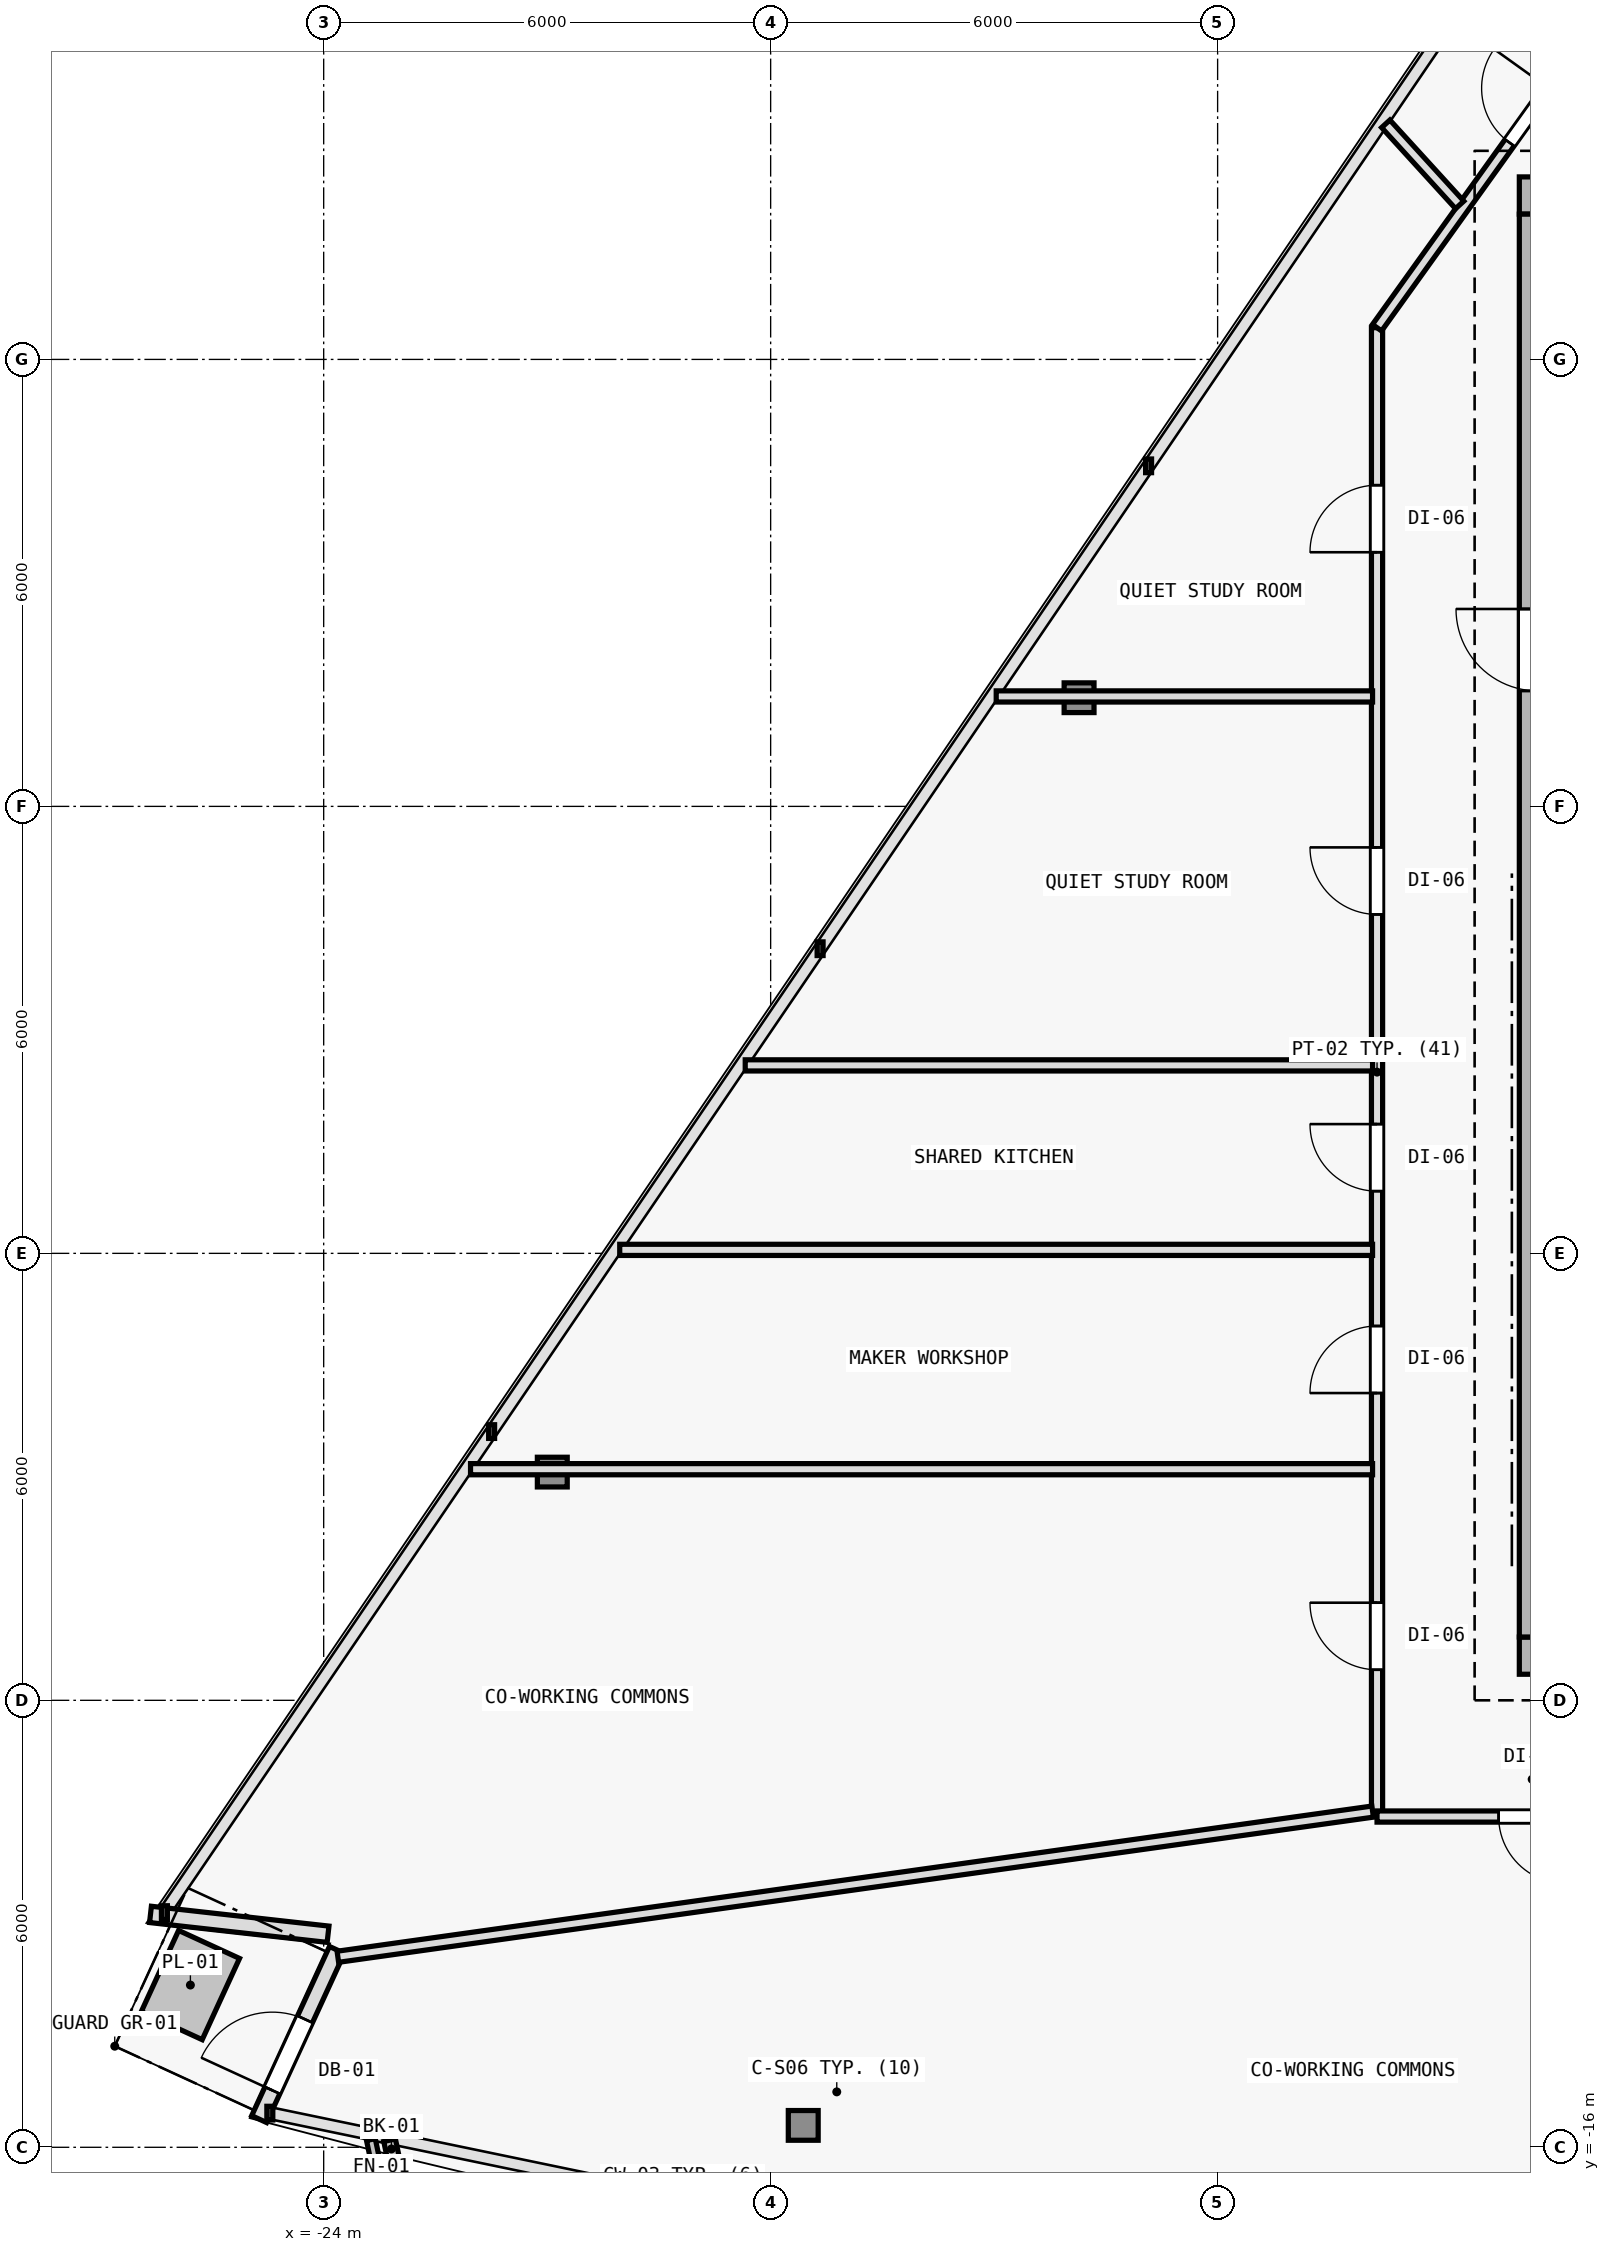
"""IFC4 building model, lengths in metres.
Left out: names, types, materials, properties, quantities, classifications, styles, units other than length and angle.
Written with IfcOpenShell. Run it as: python <this file> out.ifc"""

import sys

from ifc_helpers import new_model, si_unit, direction, frame, frame_2d, origin, origin_2d, place, context, subcontext, project, spatial, rectangle, i_section, extrude, element, fill, save


model = new_model("IFC4")
c1 = context("Model", 3, precision=1e-05, world=origin(), true_north=direction((0.0, 1.0)))
c2 = subcontext(c1, "Body", "Model", "MODEL_VIEW")
j1 = project(units=[si_unit("LENGTHUNIT", "METRE"), si_unit("PLANEANGLEUNIT", "RADIAN")], contexts=[c1])
p1 = place(None, origin())
s1 = spatial("IfcSite", under=j1, at=p1, CompositionType="ELEMENT")
p2 = place(p1, origin())
s2 = spatial("IfcBuilding", under=s1, at=p2, CompositionType="ELEMENT")
p3 = place(p2, frame((0.0, 0.0, 167.4)))
s3 = spatial("IfcBuildingStorey", under=s2, at=p3, CompositionType="ELEMENT", Elevation=167.4)
for number, where, z_axis, x_axis in (
    (1, (-7.7, -9.4, 0.0), (0.0, 0.0, 1.0), (1.0, 0.0, 0.0)),
    (2, (-7.7, 10.2, 0.0), (0.0, 0.0, 1.0), (1.0, 0.0, 0.0)),
    (3, (-7.7, 2.0, 0.0), (0.0, 0.0, 1.0), (1.0, 0.0, 0.0)),
):
    element("IfcColumn", number, at=place(p3, frame(where, z_axis=z_axis, x_axis=x_axis)), inside=s3, PredefinedType="COLUMN", context=c2, shape_type="SweptSolid", body=[
        extrude(i_section(OverallWidth=0.404, OverallDepth=0.407, WebThickness=0.017, FlangeThickness=0.028, FilletRadius=0.015, at=origin_2d()), origin(), (0.0, 0.0, 1.0), 3.6),
    ])
p4 = place(p3, frame((-17.562, -15.706, 0.006), z_axis=(0.020596292833, 0.033511459955, 0.999226087917), x_axis=(-0.851954850327, 0.523615252838, 0.0)))
e4 = element("IfcColumn", 4, at=p4, inside=s3, PredefinedType="COLUMN", context=c2, shape_type="SweptSolid", body=[
    extrude(i_section(OverallWidth=0.401, OverallDepth=0.399, WebThickness=0.016, FlangeThickness=0.025, FilletRadius=0.015, at=origin_2d()), origin(), (0.0, 0.0, 1.0), 3.592),
])
p5 = place(p3, frame((-13.86, 3.459, 0.006), z_axis=(0.017003572908, 0.009522000828, 0.999810086971), x_axis=(-0.488603368932, 0.87250601595, 0.0)))
e5 = element("IfcColumn", 5, at=p5, inside=s3, PredefinedType="COLUMN", context=c2, shape_type="SweptSolid", body=[
    extrude(i_section(OverallWidth=0.401, OverallDepth=0.399, WebThickness=0.016, FlangeThickness=0.025, FilletRadius=0.015, at=origin_2d()), origin(), (0.0, 0.0, 1.0), 3.59),
])
p6 = place(p3, frame((-20.931, -6.936, 0.006), z_axis=(0.025224163578, 0.021620711639, 0.999447990843), x_axis=(-0.650791373456, 0.759256602365, 0.0)))
e6 = element("IfcColumn", 6, at=p6, inside=s3, PredefinedType="COLUMN", context=c2, shape_type="SweptSolid", body=[
    extrude(i_section(OverallWidth=0.401, OverallDepth=0.399, WebThickness=0.016, FlangeThickness=0.025, FilletRadius=0.015, at=origin_2d()), origin(), (0.0, 0.0, 1.0), 3.591),
])
p7 = place(p3, frame((-23.941, -13.14, 0.0), z_axis=(0.0, 0.0, 1.0), x_axis=(-0.993825249999, 0.110956624245, 0.0)))
e7 = element("IfcWall", 7, at=p7, inside=s3, PredefinedType="SOLIDWALL", context=c2, shape_type="SweptSolid", body=[
    extrude(rectangle(XDim=2.398, YDim=0.22, at=frame_2d((1.199, 0.0))), origin(), (0.0, 0.0, 1.0), 3.35),
])
p8 = place(p3, frame((-24.866, -15.622, 0.0), z_axis=(0.0, 0.0, 1.0), x_axis=(0.417478378529, 0.908686856657, 0.0)))
e8 = element("IfcWall", 8, at=p8, inside=s3, PredefinedType="SOLIDWALL", context=c2, shape_type="SweptSolid", body=[
    extrude(rectangle(XDim=2.5, YDim=0.22, at=frame_2d((1.25, 0.0))), origin(), (0.0, 0.0, 1.0), 3.35),
])
p9 = place(p8, frame((0.425, 0.0, 0.0)))
e9 = element("IfcOpeningElement", 9, at=p9, cuts=e8, PredefinedType="OPENING", context=c2, shape_type="SweptSolid", body=[
    extrude(rectangle(XDim=1.05, YDim=2.15, at=frame_2d((0.525, 1.075))), frame((0.0, 0.12, 0.0), z_axis=(0.0, -1.0, 0.0), x_axis=(1.0, 0.0, 0.0)), (0.0, 0.0, 1.0), 0.24),
])
p10 = place(p3, frame((-7.95, -9.4, 0.0), z_axis=(0.0, 0.0, 1.0), x_axis=(1.0, 0.0, 0.0)))
e10 = element("IfcWall", 10, at=p10, inside=s3, PredefinedType="SHEAR", context=c2, shape_type="SweptSolid", body=[
    extrude(rectangle(XDim=15.9, YDim=0.5, at=frame_2d((7.95, 0.0))), origin(), (0.0, 0.0, 1.0), 3.35),
])
p11 = place(p10, frame((9.6, 0.0, 0.0)))
e11 = element("IfcOpeningElement", 11, at=p11, cuts=e10, PredefinedType="OPENING", context=c2, shape_type="SweptSolid", body=[
    extrude(rectangle(XDim=1.5, YDim=2.2, at=frame_2d((0.75, 1.1))), frame((0.0, 0.26, 0.0), z_axis=(0.0, -1.0, 0.0), x_axis=(1.0, 0.0, 0.0)), (0.0, 0.0, 1.0), 0.52),
])
p12 = place(p3, frame((7.95, 10.2, 0.0), z_axis=(0.0, 0.0, 1.0), x_axis=(-1.0, 0.0, 0.0)))
e12 = element("IfcWall", 12, at=p12, inside=s3, PredefinedType="SHEAR", context=c2, shape_type="SweptSolid", body=[
    extrude(rectangle(XDim=15.9, YDim=0.5, at=frame_2d((7.95, 0.0))), origin(), (0.0, 0.0, 1.0), 3.35),
])
p13 = place(p12, frame((4.4, 0.0, 0.0)))
e13 = element("IfcOpeningElement", 13, at=p13, cuts=e12, PredefinedType="OPENING", context=c2, shape_type="SweptSolid", body=[
    extrude(rectangle(XDim=1.1, YDim=2.15, at=frame_2d((0.55, 1.075))), frame((0.0, 0.26, 0.0), z_axis=(0.0, -1.0, 0.0), x_axis=(1.0, 0.0, 0.0)), (0.0, 0.0, 1.0), 0.52),
])
p14 = place(p3, frame((-7.7, -9.15, 0.0), z_axis=(0.0, 0.0, 1.0), x_axis=(0.0, 1.0, 0.0)))
e14 = element("IfcWall", 14, at=p14, inside=s3, PredefinedType="SHEAR", context=c2, shape_type="SweptSolid", body=[
    extrude(rectangle(XDim=19.1, YDim=0.5, at=frame_2d((9.55, 0.0))), origin(), (0.0, 0.0, 1.0), 3.35),
])
p15 = place(p14, frame((12.7, 0.0, 0.0)))
e15 = element("IfcOpeningElement", 15, at=p15, cuts=e14, PredefinedType="OPENING", context=c2, shape_type="SweptSolid", body=[
    extrude(rectangle(XDim=1.1, YDim=2.15, at=frame_2d((0.55, 1.075))), frame((0.0, 0.26, 0.0), z_axis=(0.0, -1.0, 0.0), x_axis=(1.0, 0.0, 0.0)), (0.0, 0.0, 1.0), 0.52),
])
p16 = place(p3, frame((-9.86, -11.56, 0.0), z_axis=(0.0, 0.0, 1.0), x_axis=(0.0, 1.0, 0.0)))
e16 = element("IfcWall", 16, at=p16, inside=s3, PredefinedType="PARTITIONING", context=c2, shape_type="SweptSolid", body=[
    extrude(rectangle(XDim=19.986, YDim=0.15, at=frame_2d((9.993, 0.0))), origin(), (0.0, 0.0, 1.0), 2.775),
])
p17 = place(p16, frame((8.395, 0.0, 0.0)))
e17 = element("IfcOpeningElement", 17, at=p17, cuts=e16, PredefinedType="OPENING", context=c2, shape_type="SweptSolid", body=[
    extrude(rectangle(XDim=0.9, YDim=2.1, at=frame_2d((0.45, 1.05))), frame((0.0, 0.085, 0.0), z_axis=(0.0, -1.0, 0.0), x_axis=(1.0, 0.0, 0.0)), (0.0, 0.0, 1.0), 0.17),
])
p18 = place(p16, frame((5.685, 0.0, 0.0)))
e18 = element("IfcOpeningElement", 18, at=p18, cuts=e16, PredefinedType="OPENING", context=c2, shape_type="SweptSolid", body=[
    extrude(rectangle(XDim=0.9, YDim=2.1, at=frame_2d((0.45, 1.05))), frame((0.0, 0.085, 0.0), z_axis=(0.0, -1.0, 0.0), x_axis=(1.0, 0.0, 0.0)), (0.0, 0.0, 1.0), 0.17),
])
p19 = place(p16, frame((1.97, 0.0, 0.0)))
e19 = element("IfcOpeningElement", 19, at=p19, cuts=e16, PredefinedType="OPENING", context=c2, shape_type="SweptSolid", body=[
    extrude(rectangle(XDim=0.9, YDim=2.1, at=frame_2d((0.45, 1.05))), frame((0.0, 0.085, 0.0), z_axis=(0.0, -1.0, 0.0), x_axis=(1.0, 0.0, 0.0)), (0.0, 0.0, 1.0), 0.17),
])
p20 = place(p16, frame((16.972, 0.0, 0.0)))
e20 = element("IfcOpeningElement", 20, at=p20, cuts=e16, PredefinedType="OPENING", context=c2, shape_type="SweptSolid", body=[
    extrude(rectangle(XDim=0.9, YDim=2.1, at=frame_2d((0.45, 1.05))), frame((0.0, 0.085, 0.0), z_axis=(0.0, -1.0, 0.0), x_axis=(1.0, 0.0, 0.0)), (0.0, 0.0, 1.0), 0.17),
])
p21 = place(p16, frame((12.11, 0.0, 0.0)))
e21 = element("IfcOpeningElement", 21, at=p21, cuts=e16, PredefinedType="OPENING", context=c2, shape_type="SweptSolid", body=[
    extrude(rectangle(XDim=0.9, YDim=2.1, at=frame_2d((0.45, 1.05))), frame((0.0, 0.085, 0.0), z_axis=(0.0, -1.0, 0.0), x_axis=(1.0, 0.0, 0.0)), (0.0, 0.0, 1.0), 0.17),
])
p22 = place(p3, frame((-9.86, 8.426, 0.0), z_axis=(0.0, 0.0, 1.0), x_axis=(0.582449511476, 0.812866881218, 0.0)))
e22 = element("IfcWall", 22, at=p22, inside=s3, PredefinedType="PARTITIONING", context=c2, shape_type="SweptSolid", body=[
    extrude(rectangle(XDim=4.84, YDim=0.15, at=frame_2d((2.42, 0.0))), origin(), (0.0, 0.0, 1.0), 2.965),
])
p23 = place(p22, frame((3.055, 0.0, 0.0)))
e23 = element("IfcOpeningElement", 23, at=p23, cuts=e22, PredefinedType="OPENING", context=c2, shape_type="SweptSolid", body=[
    extrude(rectangle(XDim=0.9, YDim=2.1, at=frame_2d((0.45, 1.05))), frame((0.0, 0.085, 0.0), z_axis=(0.0, -1.0, 0.0), x_axis=(1.0, 0.0, 0.0)), (0.0, 0.0, 1.0), 0.17),
])
p24 = place(p3, frame((13.18, -11.56, 0.0), z_axis=(0.0, 0.0, 1.0), x_axis=(-1.0, 0.0, 0.0)))
e24 = element("IfcWall", 24, at=p24, inside=s3, PredefinedType="PARTITIONING", context=c2, shape_type="SweptSolid", body=[
    extrude(rectangle(XDim=23.04, YDim=0.15, at=frame_2d((11.52, 0.0))), origin(), (0.0, 0.0, 1.0), 2.775),
])
p25 = place(p24, frame((20.508, 0.0, 0.0)))
e25 = element("IfcOpeningElement", 25, at=p25, cuts=e24, PredefinedType="OPENING", context=c2, shape_type="SweptSolid", body=[
    extrude(rectangle(XDim=0.9, YDim=2.1, at=frame_2d((0.45, 1.05))), frame((0.0, 0.085, 0.0), z_axis=(0.0, -1.0, 0.0), x_axis=(1.0, 0.0, 0.0)), (0.0, 0.0, 1.0), 0.17),
])
p26 = place(p24, frame((17.525, 0.0, 0.0)))
e26 = element("IfcOpeningElement", 26, at=p26, cuts=e24, PredefinedType="OPENING", context=c2, shape_type="SweptSolid", body=[
    extrude(rectangle(XDim=0.9, YDim=2.1, at=frame_2d((0.45, 1.05))), frame((0.0, 0.085, 0.0), z_axis=(0.0, -1.0, 0.0), x_axis=(1.0, 0.0, 0.0)), (0.0, 0.0, 1.0), 0.17),
])
p27 = place(p24, frame((14.848, 0.0, 0.0)))
e27 = element("IfcOpeningElement", 27, at=p27, cuts=e24, PredefinedType="OPENING", context=c2, shape_type="SweptSolid", body=[
    extrude(rectangle(XDim=0.9, YDim=2.1, at=frame_2d((0.45, 1.05))), frame((0.0, 0.085, 0.0), z_axis=(0.0, -1.0, 0.0), x_axis=(1.0, 0.0, 0.0)), (0.0, 0.0, 1.0), 0.17),
])
p28 = place(p24, frame((11.422, 0.0, 0.0)))
e28 = element("IfcOpeningElement", 28, at=p28, cuts=e24, PredefinedType="OPENING", context=c2, shape_type="SweptSolid", body=[
    extrude(rectangle(XDim=0.9, YDim=2.1, at=frame_2d((0.45, 1.05))), frame((0.0, 0.085, 0.0), z_axis=(0.0, -1.0, 0.0), x_axis=(1.0, 0.0, 0.0)), (0.0, 0.0, 1.0), 0.17),
])
p29 = place(p24, frame((8.225, 0.0, 0.0)))
e29 = element("IfcOpeningElement", 29, at=p29, cuts=e24, PredefinedType="OPENING", context=c2, shape_type="SweptSolid", body=[
    extrude(rectangle(XDim=0.9, YDim=2.1, at=frame_2d((0.45, 1.05))), frame((0.0, 0.085, 0.0), z_axis=(0.0, -1.0, 0.0), x_axis=(1.0, 0.0, 0.0)), (0.0, 0.0, 1.0), 0.17),
])
p30 = place(p24, frame((5.729, 0.0, 0.0)))
e30 = element("IfcOpeningElement", 30, at=p30, cuts=e24, PredefinedType="OPENING", context=c2, shape_type="SweptSolid", body=[
    extrude(rectangle(XDim=0.9, YDim=2.1, at=frame_2d((0.45, 1.05))), frame((0.0, 0.085, 0.0), z_axis=(0.0, -1.0, 0.0), x_axis=(1.0, 0.0, 0.0)), (0.0, 0.0, 1.0), 0.17),
])
p31 = place(p24, frame((2.955, 0.0, 0.0)))
e31 = element("IfcOpeningElement", 31, at=p31, cuts=e24, PredefinedType="OPENING", context=c2, shape_type="SweptSolid", body=[
    extrude(rectangle(XDim=0.9, YDim=2.1, at=frame_2d((0.45, 1.05))), frame((0.0, 0.085, 0.0), z_axis=(0.0, -1.0, 0.0), x_axis=(1.0, 0.0, 0.0)), (0.0, 0.0, 1.0), 0.17),
])
p32 = place(p24, frame((0.478, 0.0, 0.0)))
e32 = element("IfcOpeningElement", 32, at=p32, cuts=e24, PredefinedType="OPENING", context=c2, shape_type="SweptSolid", body=[
    extrude(rectangle(XDim=0.85, YDim=2.1, at=frame_2d((0.425, 1.05))), frame((0.0, 0.085, 0.0), z_axis=(0.0, -1.0, 0.0), x_axis=(1.0, 0.0, 0.0)), (0.0, 0.0, 1.0), 0.17),
])
p33 = place(p3, frame((-9.92, 3.476, 0.0), z_axis=(0.0, 0.0, 1.0), x_axis=(-1.0, 0.0, 0.0)))
e33 = element("IfcWall", 33, at=p33, inside=s3, PredefinedType="PARTITIONING", context=c2, shape_type="SweptSolid", body=[
    extrude(rectangle(XDim=5.052, YDim=0.15, at=frame_2d((2.526, 0.0))), origin(), (0.0, 0.0, 1.0), 2.935),
])
p34 = place(p3, frame((-9.92, -6.897, 0.0), z_axis=(0.0, 0.0, 1.0), x_axis=(-1.0, 0.0, 0.0)))
e34 = element("IfcWall", 34, at=p34, inside=s3, PredefinedType="PARTITIONING", context=c2, shape_type="SweptSolid", body=[
    extrude(rectangle(XDim=12.109, YDim=0.15, at=frame_2d((6.054, 0.0))), origin(), (0.0, 0.0, 1.0), 2.725),
])
p35 = place(p3, frame((-9.92, -1.477, 0.0), z_axis=(0.0, 0.0, 1.0), x_axis=(-1.0, 0.0, 0.0)))
e35 = element("IfcWall", 35, at=p35, inside=s3, PredefinedType="PARTITIONING", context=c2, shape_type="SweptSolid", body=[
    extrude(rectangle(XDim=8.421, YDim=0.15, at=frame_2d((4.211, 0.0))), origin(), (0.0, 0.0, 1.0), 2.725),
])
p36 = place(p3, frame((-8.75, 10.074, 0.0), z_axis=(0.0, 0.0, 1.0), x_axis=(-0.673703282985, 0.739001952971, 0.0)))
e36 = element("IfcWall", 36, at=p36, inside=s3, PredefinedType="PARTITIONING", context=c2, shape_type="SweptSolid", body=[
    extrude(rectangle(XDim=1.473, YDim=0.15, at=frame_2d((0.737, 0.0))), origin(), (0.0, 0.0, 1.0), 2.935),
])
p37 = place(p3, frame((-9.92, -3.953, 0.0), z_axis=(0.0, 0.0, 1.0), x_axis=(-1.0, 0.0, 0.0)))
e37 = element("IfcWall", 37, at=p37, inside=s3, PredefinedType="PARTITIONING", context=c2, shape_type="SweptSolid", body=[
    extrude(rectangle(XDim=10.106, YDim=0.15, at=frame_2d((5.053, 0.0))), origin(), (0.0, 0.0, 1.0), 2.725),
])
p38 = place(p3, frame((-9.919, -11.494, 0.0), z_axis=(0.0, 0.0, 1.0), x_axis=(-0.990302465123, -0.138928138155, 0.0)))
e38 = element("IfcWall", 38, at=p38, inside=s3, PredefinedType="PARTITIONING", context=c2, shape_type="SweptSolid", body=[
    extrude(rectangle(XDim=14.027, YDim=0.15, at=frame_2d((7.013, 0.0))), origin(), (0.0, 0.0, 1.0), 2.775),
])
p39 = place(p9, origin())
e39 = element("IfcDoor", 39, at=p39, inside=s3, OperationType="SINGLE_SWING_LEFT", PredefinedType="DOOR", context=c2, shape_type="SweptSolid", body=[
    extrude(rectangle(XDim=1.05, YDim=2.15, at=frame_2d((0.525, 1.075))), frame((0.0, 0.025, 0.0), z_axis=(0.0, -1.0, 0.0), x_axis=(1.0, 0.0, 0.0)), (0.0, 0.0, 1.0), 0.05),
])
fill(e9, e39)
p40 = place(p17, origin())
e40 = element("IfcDoor", 40, at=p40, inside=s3, OperationType="SINGLE_SWING_RIGHT", PredefinedType="DOOR", context=c2, shape_type="SweptSolid", body=[
    extrude(rectangle(XDim=0.9, YDim=2.1, at=frame_2d((0.45, 1.05))), frame((0.0, 0.025, 0.0), z_axis=(0.0, -1.0, 0.0), x_axis=(1.0, 0.0, 0.0)), (0.0, 0.0, 1.0), 0.05),
])
fill(e17, e40)
p41 = place(p18, origin())
e41 = element("IfcDoor", 41, at=p41, inside=s3, OperationType="SINGLE_SWING_LEFT", PredefinedType="DOOR", context=c2, shape_type="SweptSolid", body=[
    extrude(rectangle(XDim=0.9, YDim=2.1, at=frame_2d((0.45, 1.05))), frame((0.0, 0.025, 0.0), z_axis=(0.0, -1.0, 0.0), x_axis=(1.0, 0.0, 0.0)), (0.0, 0.0, 1.0), 0.05),
])
fill(e18, e41)
p42 = place(p19, origin())
e42 = element("IfcDoor", 42, at=p42, inside=s3, OperationType="SINGLE_SWING_RIGHT", PredefinedType="DOOR", context=c2, shape_type="SweptSolid", body=[
    extrude(rectangle(XDim=0.9, YDim=2.1, at=frame_2d((0.45, 1.05))), frame((0.0, 0.025, 0.0), z_axis=(0.0, -1.0, 0.0), x_axis=(1.0, 0.0, 0.0)), (0.0, 0.0, 1.0), 0.05),
])
fill(e19, e42)
p43 = place(p25, origin())
e43 = element("IfcDoor", 43, at=p43, inside=s3, OperationType="SINGLE_SWING_LEFT", PredefinedType="DOOR", context=c2, shape_type="SweptSolid", body=[
    extrude(rectangle(XDim=0.9, YDim=2.1, at=frame_2d((0.45, 1.05))), frame((0.0, 0.025, 0.0), z_axis=(0.0, -1.0, 0.0), x_axis=(1.0, 0.0, 0.0)), (0.0, 0.0, 1.0), 0.05),
])
fill(e25, e43)
p44 = place(p23, origin())
e44 = element("IfcDoor", 44, at=p44, inside=s3, OperationType="SINGLE_SWING_RIGHT", PredefinedType="DOOR", context=c2, shape_type="SweptSolid", body=[
    extrude(rectangle(XDim=0.9, YDim=2.1, at=frame_2d((0.45, 1.05))), frame((0.0, 0.025, 0.0), z_axis=(0.0, -1.0, 0.0), x_axis=(1.0, 0.0, 0.0)), (0.0, 0.0, 1.0), 0.05),
])
fill(e23, e44)
p45 = place(p20, origin())
e45 = element("IfcDoor", 45, at=p45, inside=s3, OperationType="SINGLE_SWING_LEFT", PredefinedType="DOOR", context=c2, shape_type="SweptSolid", body=[
    extrude(rectangle(XDim=0.9, YDim=2.1, at=frame_2d((0.45, 1.05))), frame((0.0, 0.025, 0.0), z_axis=(0.0, -1.0, 0.0), x_axis=(1.0, 0.0, 0.0)), (0.0, 0.0, 1.0), 0.05),
])
fill(e20, e45)
p46 = place(p21, origin())
e46 = element("IfcDoor", 46, at=p46, inside=s3, OperationType="SINGLE_SWING_RIGHT", PredefinedType="DOOR", context=c2, shape_type="SweptSolid", body=[
    extrude(rectangle(XDim=0.9, YDim=2.1, at=frame_2d((0.45, 1.05))), frame((0.0, 0.025, 0.0), z_axis=(0.0, -1.0, 0.0), x_axis=(1.0, 0.0, 0.0)), (0.0, 0.0, 1.0), 0.05),
])
fill(e21, e46)
save(model, sys.argv[1])
